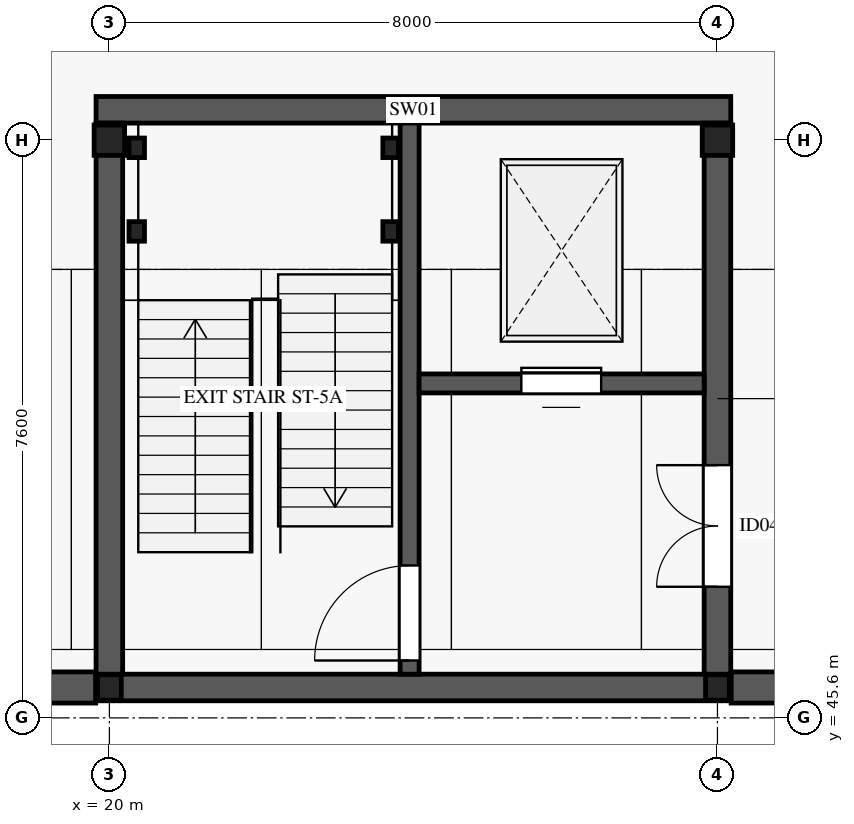
"""IFC4 building model, lengths in metres.
Left out: names, types, materials, properties, quantities, classifications, styles, units other than length and angle.
Written with IfcOpenShell. Run it as: python <this file> out.ifc"""

import sys

from ifc_helpers import new_model, si_unit, direction, frame, frame_2d, origin, origin_2d, place, context, subcontext, project, spatial, rectangle, i_section, extrude, element, fill, save


model = new_model("IFC4")
c1 = context("Model", 3, precision=1e-05, world=origin(), true_north=direction((0.0, 1.0)))
c2 = subcontext(c1, "Body", "Model", "MODEL_VIEW")
j1 = project(units=[si_unit("LENGTHUNIT", "METRE"), si_unit("PLANEANGLEUNIT", "RADIAN")], contexts=[c1])
p1 = place(None, origin())
s1 = spatial("IfcSite", under=j1, at=p1, CompositionType="ELEMENT")
p2 = place(p1, origin())
s2 = spatial("IfcBuilding", under=s1, at=p2, CompositionType="ELEMENT")
p3 = place(p2, frame((0.0, 0.0, -4.8)))
s3 = spatial("IfcBuildingStorey", under=s2, at=p3, CompositionType="ELEMENT", Elevation=-4.8)
p4 = place(p3, frame((20.0, 46.0, 0.0), z_axis=(0.0, 0.0, 1.0), x_axis=(1.0, 0.0, 0.0)))
e1 = element("IfcColumn", 1, at=p4, inside=s3, PredefinedType="COLUMN", context=c2, shape_type="SweptSolid", body=[
    extrude(i_section(OverallWidth=0.313, OverallDepth=0.333, WebThickness=0.018, FlangeThickness=0.028, FilletRadius=0.015, at=origin_2d()), origin(), (0.0, 0.0, 1.0), 4.58),
])
p5 = place(p3, frame((20.0, 53.2, 0.0), z_axis=(0.0, 0.0, 1.0), x_axis=(1.0, 0.0, 0.0)))
e2 = element("IfcColumn", 2, at=p5, inside=s3, PredefinedType="COLUMN", context=c2, shape_type="SweptSolid", body=[
    extrude(i_section(OverallWidth=0.401, OverallDepth=0.399, WebThickness=0.025, FlangeThickness=0.04, FilletRadius=0.015, at=origin_2d()), origin(), (0.0, 0.0, 1.0), 4.58),
])
p6 = place(p3, frame((28.0, 46.0, 0.0), z_axis=(0.0, 0.0, 1.0), x_axis=(1.0, 0.0, 0.0)))
e3 = element("IfcColumn", 3, at=p6, inside=s3, PredefinedType="COLUMN", context=c2, shape_type="SweptSolid", body=[
    extrude(i_section(OverallWidth=0.313, OverallDepth=0.333, WebThickness=0.018, FlangeThickness=0.028, FilletRadius=0.015, at=origin_2d()), origin(), (0.0, 0.0, 1.0), 4.58),
])
p7 = place(p3, frame((28.0, 53.2, 0.0), z_axis=(0.0, 0.0, 1.0), x_axis=(1.0, 0.0, 0.0)))
e4 = element("IfcColumn", 4, at=p7, inside=s3, PredefinedType="COLUMN", context=c2, shape_type="SweptSolid", body=[
    extrude(i_section(OverallWidth=0.401, OverallDepth=0.399, WebThickness=0.025, FlangeThickness=0.04, FilletRadius=0.015, at=origin_2d()), origin(), (0.0, 0.0, 1.0), 4.58),
])
p8 = place(p3, frame((3.795, 46.0, 0.0), z_axis=(0.0, 0.0, 1.0), x_axis=(1.0, 0.0, 0.0)))
e5 = element("IfcWall", 5, at=p8, inside=s3, PredefinedType="USERDEFINED", context=c2, shape_type="SweptSolid", body=[
    extrude(rectangle(XDim=16.025, YDim=0.41, at=frame_2d((8.013, 0.0))), origin(), (0.0, 0.0, 1.0), 4.58),
])
p9 = place(p3, frame((28.18, 46.0, 0.0), z_axis=(0.0, 0.0, 1.0), x_axis=(1.0, 0.0, 0.0)))
e6 = element("IfcWall", 6, at=p9, inside=s3, PredefinedType="USERDEFINED", context=c2, shape_type="SweptSolid", body=[
    extrude(rectangle(XDim=80.025, YDim=0.41, at=frame_2d((40.013, 0.0))), origin(), (0.0, 0.0, 1.0), 4.58),
])
for number, where, z_axis, x_axis in (
    (7, (19.825, 46.0, 0.0), (0.0, 0.0, 1.0), (1.0, 0.0, 0.0)),
    (8, (19.825, 53.6, 0.0), (0.0, 0.0, 1.0), (1.0, 0.0, 0.0)),
):
    element("IfcWall", number, at=place(p3, frame(where, z_axis=z_axis, x_axis=x_axis)), inside=s3, PredefinedType="SHEAR", context=c2, shape_type="SweptSolid", body=[
        extrude(rectangle(XDim=8.35, YDim=0.35, at=frame_2d((4.175, 0.0))), origin(), (0.0, 0.0, 1.0), 4.59),
    ])
p10 = place(p3, frame((20.0, 46.175, 0.0), z_axis=(0.0, 0.0, 1.0), x_axis=(0.0, 1.0, 0.0)))
e9 = element("IfcWall", 9, at=p10, inside=s3, PredefinedType="SHEAR", context=c2, shape_type="SweptSolid", body=[
    extrude(rectangle(XDim=7.25, YDim=0.35, at=frame_2d((3.625, 0.0))), origin(), (0.0, 0.0, 1.0), 4.59),
])
p11 = place(p3, frame((28.0, 46.175, 0.0), z_axis=(0.0, 0.0, 1.0), x_axis=(0.0, 1.0, 0.0)))
e10 = element("IfcWall", 10, at=p11, inside=s3, PredefinedType="SHEAR", context=c2, shape_type="SweptSolid", body=[
    extrude(rectangle(XDim=7.25, YDim=0.35, at=frame_2d((3.625, 0.0))), origin(), (0.0, 0.0, 1.0), 4.59),
])
p12 = place(p11, frame((1.15, 0.0, 0.0)))
e11 = element("IfcOpeningElement", 11, at=p12, cuts=e10, PredefinedType="OPENING", context=c2, shape_type="SweptSolid", body=[
    extrude(rectangle(XDim=1.6, YDim=2.35, at=frame_2d((0.8, 1.175))), frame((0.0, 0.185, 0.0), z_axis=(0.0, -1.0, 0.0), x_axis=(1.0, 0.0, 0.0)), (0.0, 0.0, 1.0), 0.37),
])
p13 = place(p3, frame((23.95, 46.175, 0.0), z_axis=(0.0, 0.0, 1.0), x_axis=(0.0, 1.0, 0.0)))
e12 = element("IfcWall", 12, at=p13, inside=s3, PredefinedType="SHEAR", context=c2, shape_type="SweptSolid", body=[
    extrude(rectangle(XDim=7.25, YDim=0.25, at=frame_2d((3.625, 0.0))), origin(), (0.0, 0.0, 1.0), 4.59),
])
p14 = place(p13, frame((0.18, 0.0, 0.0)))
e13 = element("IfcOpeningElement", 13, at=p14, cuts=e12, PredefinedType="OPENING", context=c2, shape_type="SweptSolid", body=[
    extrude(rectangle(XDim=1.25, YDim=2.2, at=frame_2d((0.625, 1.1))), frame((0.0, 0.135, 0.0), z_axis=(0.0, -1.0, 0.0), x_axis=(1.0, 0.0, 0.0)), (0.0, 0.0, 1.0), 0.27),
])
p15 = place(p3, frame((24.075, 50.0, 0.0), z_axis=(0.0, 0.0, 1.0), x_axis=(1.0, 0.0, 0.0)))
e14 = element("IfcWall", 14, at=p15, inside=s3, PredefinedType="SHEAR", context=c2, shape_type="SweptSolid", body=[
    extrude(rectangle(XDim=3.75, YDim=0.25, at=frame_2d((1.875, 0.0))), origin(), (0.0, 0.0, 1.0), 4.59),
])
p16 = place(p15, frame((1.345, 0.0, 0.0)))
e15 = element("IfcOpeningElement", 15, at=p16, cuts=e14, PredefinedType="OPENING", context=c2, shape_type="SweptSolid", body=[
    extrude(rectangle(XDim=1.05, YDim=2.2, at=frame_2d((0.525, 1.1))), frame((0.0, 0.135, 0.0), z_axis=(0.0, -1.0, 0.0), x_axis=(1.0, 0.0, 0.0)), (0.0, 0.0, 1.0), 0.27),
])
for number, where, z_axis, x_axis in (
    (16, (20.36, 52.0, 0.0), (0.0, 0.0, 1.0), (1.0, 0.0, 0.0)),
    (17, (23.7, 52.0, 0.0), (0.0, 0.0, 1.0), (1.0, 0.0, 0.0)),
    (18, (20.36, 53.1, 0.0), (0.0, 0.0, 1.0), (1.0, 0.0, 0.0)),
    (19, (23.7, 53.1, 0.0), (0.0, 0.0, 1.0), (1.0, 0.0, 0.0)),
):
    element("IfcColumn", number, at=place(p3, frame(where, z_axis=z_axis, x_axis=x_axis)), inside=s3, PredefinedType="COLUMN", context=c2, shape_type="SweptSolid", body=[
        extrude(i_section(OverallWidth=0.204, OverallDepth=0.257, WebThickness=0.009, FlangeThickness=0.016, FilletRadius=0.013, at=origin_2d()), origin(), (0.0, 0.0, 1.0), 4.795),
    ])
p17 = place(p14, origin())
e20 = element("IfcDoor", 20, at=p17, inside=s3, OperationType="SINGLE_SWING_LEFT", PredefinedType="DOOR", context=c2, shape_type="SweptSolid", body=[
    extrude(rectangle(XDim=1.25, YDim=2.2, at=frame_2d((0.625, 1.1))), frame((0.0, 0.025, 0.0), z_axis=(0.0, -1.0, 0.0), x_axis=(1.0, 0.0, 0.0)), (0.0, 0.0, 1.0), 0.05),
])
fill(e13, e20)
p18 = place(p12, origin())
e21 = element("IfcDoor", 21, at=p18, inside=s3, OperationType="DOUBLE_DOOR_SINGLE_SWING", PredefinedType="DOOR", context=c2, shape_type="SweptSolid", body=[
    extrude(rectangle(XDim=1.6, YDim=2.35, at=frame_2d((0.8, 1.175))), frame((0.0, 0.025, 0.0), z_axis=(0.0, -1.0, 0.0), x_axis=(1.0, 0.0, 0.0)), (0.0, 0.0, 1.0), 0.05),
])
fill(e11, e21)
p19 = place(p16, origin())
e22 = element("IfcDoor", 22, at=p19, inside=s3, OperationType="SLIDING_TO_RIGHT", PredefinedType="DOOR", context=c2, shape_type="SweptSolid", body=[
    extrude(rectangle(XDim=1.05, YDim=2.2, at=frame_2d((0.525, 1.1))), frame((0.0, 0.025, 0.0), z_axis=(0.0, -1.0, 0.0), x_axis=(1.0, 0.0, 0.0)), (0.0, 0.0, 1.0), 0.05),
])
fill(e15, e22)
save(model, sys.argv[1])
